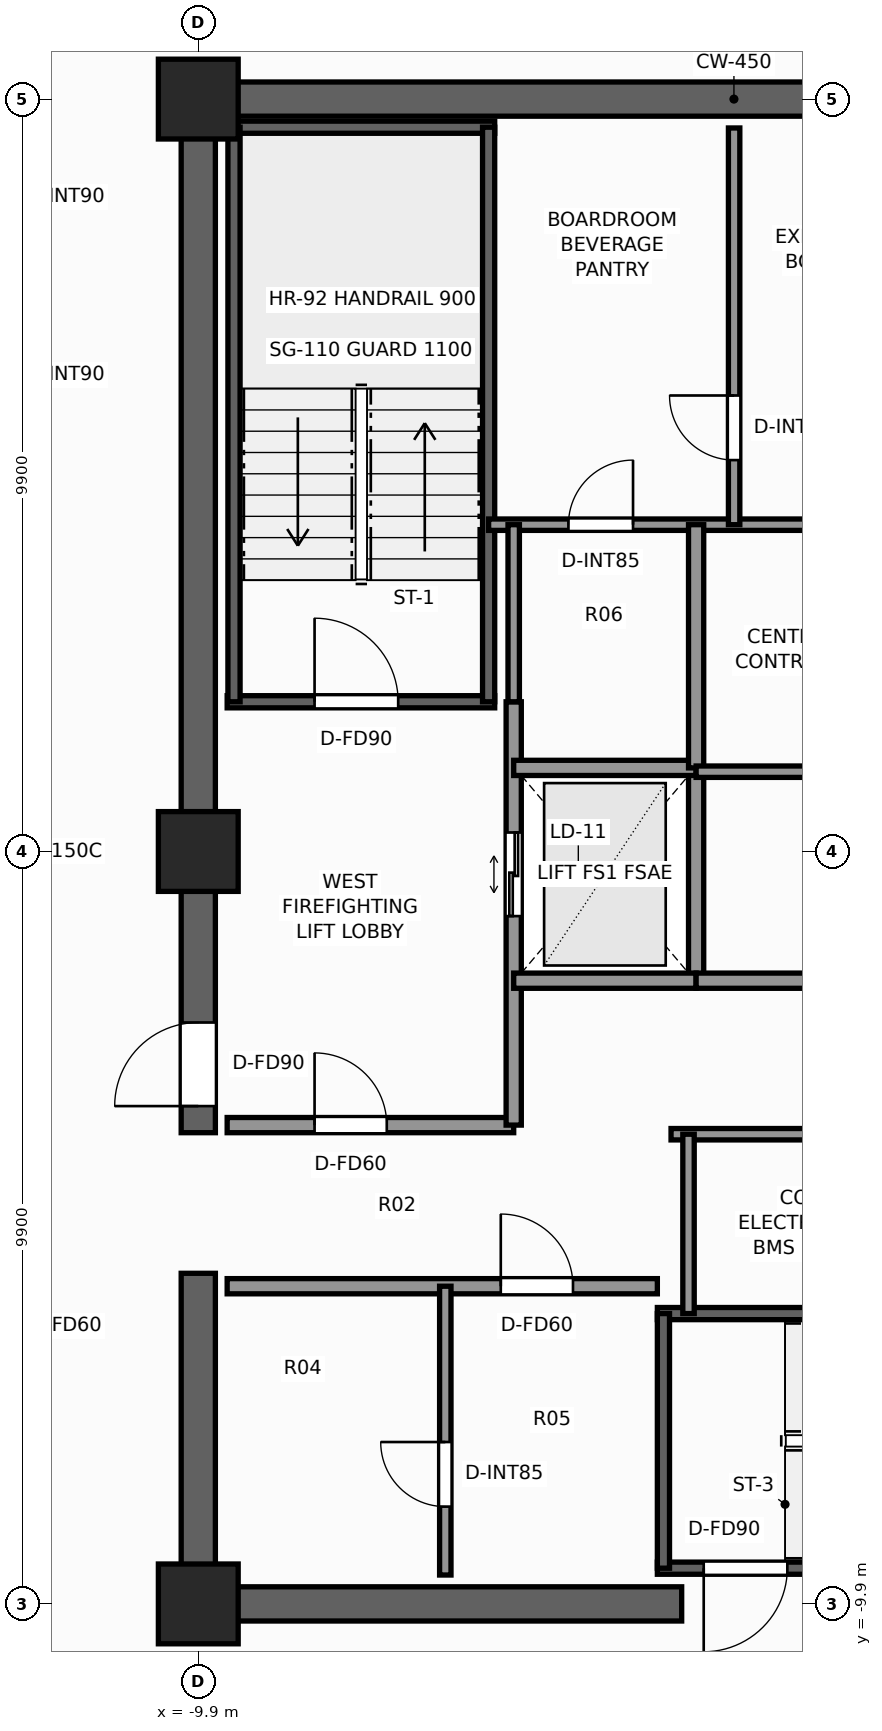
"""IFC4 building model, lengths in metres.
Left out: names, types, materials, properties, quantities, classifications, styles, units other than length and angle.
Written with IfcOpenShell. Run it as: python <this file> out.ifc"""

import sys

from ifc_helpers import new_model, si_unit, direction, frame, frame_2d, origin, origin_2d, place, context, subcontext, project, spatial, rectangle, extrude, element, fill, save


model = new_model("IFC4")
c1 = context("Model", 3, precision=1e-05, world=origin(), true_north=direction((0.0, 1.0)))
c2 = subcontext(c1, "Body", "Model", "MODEL_VIEW")
j1 = project(units=[si_unit("LENGTHUNIT", "METRE"), si_unit("PLANEANGLEUNIT", "RADIAN")], contexts=[c1])
p1 = place(None, origin())
s1 = spatial("IfcSite", under=j1, at=p1, CompositionType="ELEMENT")
p2 = place(p1, origin())
s2 = spatial("IfcBuilding", under=s1, at=p2, CompositionType="ELEMENT")
p3 = place(p2, frame((0.0, 0.0, 237.4)))
s3 = spatial("IfcBuildingStorey", under=s2, at=p3, CompositionType="ELEMENT", Elevation=237.4)
p4 = place(p3, frame((-3.54, -9.9, 0.0), z_axis=(0.0, 0.0, 1.0), x_axis=(-1.0, 0.0, 0.0)))
e1 = element("IfcWall", 1, at=p4, inside=s3, PredefinedType="SHEAR", context=c2, shape_type="SweptSolid", body=[
    extrude(rectangle(XDim=6.585, YDim=0.45, at=frame_2d((3.292, 0.0))), origin(), (0.0, 0.0, 1.0), 3.5),
])
p5 = place(p3, frame((-10.125, 9.9, 0.0), z_axis=(0.0, 0.0, 1.0), x_axis=(1.0, 0.0, 0.0)))
e2 = element("IfcWall", 2, at=p5, inside=s3, PredefinedType="SHEAR", context=c2, shape_type="SweptSolid", body=[
    extrude(rectangle(XDim=14.545, YDim=0.45, at=frame_2d((7.272, 0.0))), origin(), (0.0, 0.0, 1.0), 3.5),
])
p6 = place(p3, frame((-9.9, -9.675, 0.0), z_axis=(0.0, 0.0, 1.0), x_axis=(0.0, 1.0, 0.0)))
e3 = element("IfcWall", 3, at=p6, inside=s3, PredefinedType="SHEAR", context=c2, shape_type="SweptSolid", body=[
    extrude(rectangle(XDim=4.125, YDim=0.45, at=frame_2d((2.062, 0.0))), origin(), (0.0, 0.0, 1.0), 3.5),
])
p7 = place(p3, frame((-9.9, -3.7, 0.0), z_axis=(0.0, 0.0, 1.0), x_axis=(0.0, 1.0, 0.0)))
e4 = element("IfcWall", 4, at=p7, inside=s3, PredefinedType="SHEAR", context=c2, shape_type="SweptSolid", body=[
    extrude(rectangle(XDim=13.375, YDim=0.45, at=frame_2d((6.688, 0.0))), origin(), (0.0, 0.0, 1.0), 3.5),
])
p8 = place(p7, frame((0.35, 0.0, 0.0)))
e5 = element("IfcOpeningElement", 5, at=p8, cuts=e4, PredefinedType="OPENING", context=c2, shape_type="SweptSolid", body=[
    extrude(rectangle(XDim=1.1, YDim=2.2, at=frame_2d((0.55, 1.1))), frame((0.0, 0.235, 0.0), z_axis=(0.0, -1.0, 0.0), x_axis=(1.0, 0.0, 0.0)), (0.0, 0.0, 1.0), 0.47),
])
for number, where, z_axis, x_axis in (
    (6, (-9.9, -9.9, 0.0), (0.0, 0.0, 1.0), (1.0, 0.0, 0.0)),
    (7, (-9.9, 9.9, 0.0), (0.0, 0.0, 1.0), (1.0, 0.0, 0.0)),
    (8, (-9.9, 0.0, 0.0), (0.0, 0.0, 1.0), (1.0, 0.0, 0.0)),
):
    element("IfcColumn", number, at=place(p3, frame(where, z_axis=z_axis, x_axis=x_axis)), inside=s3, PredefinedType="COLUMN", context=c2, shape_type="SweptSolid", body=[
        extrude(rectangle(XDim=1.05, YDim=1.05, at=origin_2d()), origin(), (0.0, 0.0, 1.0), 3.5),
    ])
p9 = place(p3, frame((-9.52, 1.97, 0.0), z_axis=(0.0, 0.0, 1.0), x_axis=(1.0, 0.0, 0.0)))
e9 = element("IfcWall", 9, at=p9, inside=s3, PredefinedType="SHEAR", context=c2, shape_type="SweptSolid", body=[
    extrude(rectangle(XDim=3.52, YDim=0.16, at=frame_2d((1.76, 0.0))), origin(), (0.0, 0.0, 1.0), 3.5),
])
p10 = place(p9, frame((1.15, 0.0, 0.0)))
e10 = element("IfcOpeningElement", 10, at=p10, cuts=e9, PredefinedType="OPENING", context=c2, shape_type="SweptSolid", body=[
    extrude(rectangle(XDim=1.1, YDim=2.2, at=frame_2d((0.55, 1.1))), frame((0.0, 0.09, 0.0), z_axis=(0.0, -1.0, 0.0), x_axis=(1.0, 0.0, 0.0)), (0.0, 0.0, 1.0), 0.18),
])
p11 = place(p3, frame((-9.52, 9.53, 0.0), z_axis=(0.0, 0.0, 1.0), x_axis=(1.0, 0.0, 0.0)))
e11 = element("IfcWall", 11, at=p11, inside=s3, PredefinedType="SHEAR", context=c2, shape_type="SweptSolid", body=[
    extrude(rectangle(XDim=3.52, YDim=0.16, at=frame_2d((1.76, 0.0))), origin(), (0.0, 0.0, 1.0), 3.5),
])
for number, where, z_axis, x_axis in (
    (12, (-9.43, 1.97, 0.0), (0.0, 0.0, 1.0), (0.0, 1.0, 0.0)),
    (13, (-6.08, 1.97, 0.0), (0.0, 0.0, 1.0), (0.0, 1.0, 0.0)),
):
    element("IfcWall", number, at=place(p3, frame(where, z_axis=z_axis, x_axis=x_axis)), inside=s3, PredefinedType="SHEAR", context=c2, shape_type="SweptSolid", body=[
        extrude(rectangle(XDim=7.56, YDim=0.16, at=frame_2d((3.78, 0.0))), origin(), (0.0, 0.0, 1.0), 3.5),
    ])
p12 = place(p3, frame((3.86, -9.43, 0.0), z_axis=(0.0, 0.0, 1.0), x_axis=(-1.0, 0.0, 0.0)))
e14 = element("IfcWall", 14, at=p12, inside=s3, PredefinedType="SHEAR", context=c2, shape_type="SweptSolid", body=[
    extrude(rectangle(XDim=7.72, YDim=0.16, at=frame_2d((3.86, 0.0))), origin(), (0.0, 0.0, 1.0), 3.5),
])
p13 = place(p12, frame((6.01, 0.0, 0.0)))
e15 = element("IfcOpeningElement", 15, at=p13, cuts=e14, PredefinedType="OPENING", context=c2, shape_type="SweptSolid", body=[
    extrude(rectangle(XDim=1.1, YDim=2.2, at=frame_2d((0.55, 1.1))), frame((0.0, 0.09, 0.0), z_axis=(0.0, -1.0, 0.0), x_axis=(1.0, 0.0, 0.0)), (0.0, 0.0, 1.0), 0.18),
])
p14 = place(p3, frame((-3.86, -6.08, 0.0), z_axis=(0.0, 0.0, 1.0), x_axis=(1.0, 0.0, 0.0)))
e16 = element("IfcWall", 16, at=p14, inside=s3, PredefinedType="SHEAR", context=c2, shape_type="SweptSolid", body=[
    extrude(rectangle(XDim=7.72, YDim=0.16, at=frame_2d((3.86, 0.0))), origin(), (0.0, 0.0, 1.0), 3.5),
])
p15 = place(p3, frame((-3.78, -9.43, 0.0), z_axis=(0.0, 0.0, 1.0), x_axis=(0.0, 1.0, 0.0)))
e17 = element("IfcWall", 17, at=p15, inside=s3, PredefinedType="SHEAR", context=c2, shape_type="SweptSolid", body=[
    extrude(rectangle(XDim=3.35, YDim=0.16, at=frame_2d((1.675, 0.0))), origin(), (0.0, 0.0, 1.0), 3.5),
])
p16 = place(p3, frame((-9.52, -3.6, 0.0), z_axis=(0.0, 0.0, 1.0), x_axis=(1.0, 0.0, 0.0)))
e18 = element("IfcWall", 18, at=p16, inside=s3, PredefinedType="SOLIDWALL", context=c2, shape_type="SweptSolid", body=[
    extrude(rectangle(XDim=3.77, YDim=0.2, at=frame_2d((1.885, 0.0))), origin(), (0.0, 0.0, 1.0), 3.25),
])
p17 = place(p16, frame((1.15, 0.0, 0.0)))
e19 = element("IfcOpeningElement", 19, at=p17, cuts=e18, PredefinedType="OPENING", context=c2, shape_type="SweptSolid", body=[
    extrude(rectangle(XDim=0.95, YDim=2.06, at=frame_2d((0.475, 1.03))), frame((0.0, 0.11, 0.0), z_axis=(0.0, -1.0, 0.0), x_axis=(1.0, 0.0, 0.0)), (0.0, 0.0, 1.0), 0.22),
])
p18 = place(p3, frame((-5.75, -3.6, 0.0), z_axis=(0.0, 0.0, 1.0), x_axis=(0.0, 1.0, 0.0)))
e20 = element("IfcWall", 20, at=p18, inside=s3, PredefinedType="SOLIDWALL", context=c2, shape_type="SweptSolid", body=[
    extrude(rectangle(XDim=5.57, YDim=0.2, at=frame_2d((2.785, 0.0))), origin(), (0.0, 0.0, 1.0), 3.25),
])
p19 = place(p18, frame((2.75, 0.0, 0.0)))
e21 = element("IfcOpeningElement", 21, at=p19, cuts=e20, PredefinedType="OPENING", context=c2, shape_type="SweptSolid", body=[
    extrude(rectangle(XDim=1.1, YDim=2.2, at=frame_2d((0.55, 1.1))), frame((0.0, 0.11, 0.0), z_axis=(0.0, -1.0, 0.0), x_axis=(1.0, 0.0, 0.0)), (0.0, 0.0, 1.0), 0.22),
])
p20 = place(p3, frame((-3.35, -1.7, 0.0), z_axis=(0.0, 0.0, 1.0), x_axis=(0.0, 1.0, 0.0)))
e22 = element("IfcWall", 22, at=p20, inside=s3, PredefinedType="SOLIDWALL", context=c2, shape_type="SweptSolid", body=[
    extrude(rectangle(XDim=2.8, YDim=0.2, at=frame_2d((1.4, 0.0))), origin(), (0.0, 0.0, 1.0), 3.25),
])
for number, where, z_axis, x_axis in (
    (23, (-5.75, -1.7, 0.0), (0.0, 0.0, 1.0), (1.0, 0.0, 0.0)),
    (24, (-5.75, 1.1, 0.0), (0.0, 0.0, 1.0), (1.0, 0.0, 0.0)),
):
    element("IfcWall", number, at=place(p3, frame(where, z_axis=z_axis, x_axis=x_axis)), inside=s3, PredefinedType="SOLIDWALL", context=c2, shape_type="SweptSolid", body=[
        extrude(rectangle(XDim=2.4, YDim=0.2, at=frame_2d((1.2, 0.0))), origin(), (0.0, 0.0, 1.0), 3.25),
    ])
p21 = place(p3, frame((-6.08, 4.3, 0.0), z_axis=(0.0, 0.0, 1.0), x_axis=(1.0, 0.0, 0.0)))
e25 = element("IfcWall", 25, at=p21, inside=s3, PredefinedType="PARTITIONING", context=c2, shape_type="SweptSolid", body=[
    extrude(rectangle(XDim=6.3, YDim=0.15, at=frame_2d((3.15, 0.0))), origin(), (0.0, 0.0, 1.0), 3.25),
])
p22 = place(p21, frame((1.05, 0.0, 0.0)))
e26 = element("IfcOpeningElement", 26, at=p22, cuts=e25, PredefinedType="OPENING", context=c2, shape_type="SweptSolid", body=[
    extrude(rectangle(XDim=0.85, YDim=2.03, at=frame_2d((0.425, 1.015))), frame((0.0, 0.085, 0.0), z_axis=(0.0, -1.0, 0.0), x_axis=(1.0, 0.0, 0.0)), (0.0, 0.0, 1.0), 0.17),
])
p23 = place(p3, frame((-2.85, 4.3, 0.0), z_axis=(0.0, 0.0, 1.0), x_axis=(0.0, 1.0, 0.0)))
e27 = element("IfcWall", 27, at=p23, inside=s3, PredefinedType="PARTITIONING", context=c2, shape_type="SweptSolid", body=[
    extrude(rectangle(XDim=5.22, YDim=0.15, at=frame_2d((2.61, 0.0))), origin(), (0.0, 0.0, 1.0), 3.25),
])
p24 = place(p23, frame((0.85, 0.0, 0.0)))
e28 = element("IfcOpeningElement", 28, at=p24, cuts=e27, PredefinedType="OPENING", context=c2, shape_type="SweptSolid", body=[
    extrude(rectangle(XDim=0.85, YDim=2.03, at=frame_2d((0.425, 1.015))), frame((0.0, 0.085, 0.0), z_axis=(0.0, -1.0, 0.0), x_axis=(1.0, 0.0, 0.0)), (0.0, 0.0, 1.0), 0.17),
])
p25 = place(p3, frame((-9.52, -5.72, 0.0), z_axis=(0.0, 0.0, 1.0), x_axis=(1.0, 0.0, 0.0)))
e29 = element("IfcWall", 29, at=p25, inside=s3, PredefinedType="SOLIDWALL", context=c2, shape_type="SweptSolid", body=[
    extrude(rectangle(XDim=5.66, YDim=0.2, at=frame_2d((2.83, 0.0))), origin(), (0.0, 0.0, 1.0), 3.25),
])
p26 = place(p25, frame((3.6, 0.0, 0.0)))
e30 = element("IfcOpeningElement", 30, at=p26, cuts=e29, PredefinedType="OPENING", context=c2, shape_type="SweptSolid", body=[
    extrude(rectangle(XDim=0.95, YDim=2.06, at=frame_2d((0.475, 1.03))), frame((0.0, 0.11, 0.0), z_axis=(0.0, -1.0, 0.0), x_axis=(1.0, 0.0, 0.0)), (0.0, 0.0, 1.0), 0.22),
])
p27 = place(p3, frame((-6.65, -9.52, 0.0), z_axis=(0.0, 0.0, 1.0), x_axis=(0.0, 1.0, 0.0)))
e31 = element("IfcWall", 31, at=p27, inside=s3, PredefinedType="PARTITIONING", context=c2, shape_type="SweptSolid", body=[
    extrude(rectangle(XDim=3.8, YDim=0.15, at=frame_2d((1.9, 0.0))), origin(), (0.0, 0.0, 1.0), 3.25),
])
p28 = place(p27, frame((0.9, 0.0, 0.0)))
e32 = element("IfcOpeningElement", 32, at=p28, cuts=e31, PredefinedType="OPENING", context=c2, shape_type="SweptSolid", body=[
    extrude(rectangle(XDim=0.85, YDim=2.03, at=frame_2d((0.425, 1.015))), frame((0.0, 0.085, 0.0), z_axis=(0.0, -1.0, 0.0), x_axis=(1.0, 0.0, 0.0)), (0.0, 0.0, 1.0), 0.17),
])
p29 = place(p3, frame((-3.35, -1.7, 0.0), z_axis=(0.0, 0.0, 1.0), x_axis=(1.0, 0.0, 0.0)))
e33 = element("IfcWall", 33, at=p29, inside=s3, PredefinedType="SOLIDWALL", context=c2, shape_type="SweptSolid", body=[
    extrude(rectangle(XDim=6.7, YDim=0.2, at=frame_2d((3.35, 0.0))), origin(), (0.0, 0.0, 1.0), 3.25),
])
p30 = place(p3, frame((-3.35, 1.1, 0.0), z_axis=(0.0, 0.0, 1.0), x_axis=(0.0, 1.0, 0.0)))
e34 = element("IfcWall", 34, at=p30, inside=s3, PredefinedType="SOLIDWALL", context=c2, shape_type="SweptSolid", body=[
    extrude(rectangle(XDim=3.2, YDim=0.2, at=frame_2d((1.6, 0.0))), origin(), (0.0, 0.0, 1.0), 3.25),
])
p31 = place(p3, frame((-3.35, 1.05, 0.0), z_axis=(0.0, 0.0, 1.0), x_axis=(1.0, 0.0, 0.0)))
e35 = element("IfcWall", 35, at=p31, inside=s3, PredefinedType="PARTITIONING", context=c2, shape_type="SweptSolid", body=[
    extrude(rectangle(XDim=6.7, YDim=0.15, at=frame_2d((3.35, 0.0))), origin(), (0.0, 0.0, 1.0), 3.25),
])
p32 = place(p31, frame((4.2, 0.0, 0.0)))
e36 = element("IfcOpeningElement", 36, at=p32, cuts=e35, PredefinedType="OPENING", context=c2, shape_type="SweptSolid", body=[
    extrude(rectangle(XDim=0.85, YDim=2.03, at=frame_2d((0.425, 1.015))), frame((0.0, 0.085, 0.0), z_axis=(0.0, -1.0, 0.0), x_axis=(1.0, 0.0, 0.0)), (0.0, 0.0, 1.0), 0.17),
])
p33 = place(p3, frame((-3.68, -3.72, 0.0), z_axis=(0.0, 0.0, 1.0), x_axis=(1.0, 0.0, 0.0)))
e37 = element("IfcWall", 37, at=p33, inside=s3, PredefinedType="PARTITIONING", context=c2, shape_type="SweptSolid", body=[
    extrude(rectangle(XDim=7.36, YDim=0.15, at=frame_2d((3.68, 0.0))), origin(), (0.0, 0.0, 1.0), 3.25),
])
p34 = place(p3, frame((-3.45, -6.08, 0.0), z_axis=(0.0, 0.0, 1.0), x_axis=(0.0, 1.0, 0.0)))
e38 = element("IfcWall", 38, at=p34, inside=s3, PredefinedType="PARTITIONING", context=c2, shape_type="SweptSolid", body=[
    extrude(rectangle(XDim=2.36, YDim=0.15, at=frame_2d((1.18, 0.0))), origin(), (0.0, 0.0, 1.0), 3.25),
])
p35 = place(p3, frame((-5.75, 1.97, 0.0), z_axis=(0.0, 0.0, 1.0), x_axis=(0.0, 1.0, 0.0)))
e39 = element("IfcWall", 39, at=p35, inside=s3, PredefinedType="PARTITIONING", context=c2, shape_type="SweptSolid", body=[
    extrude(rectangle(XDim=2.33, YDim=0.15, at=frame_2d((1.165, 0.0))), origin(), (0.0, 0.0, 1.0), 3.25),
])
p36 = place(p10, origin())
e40 = element("IfcDoor", 40, at=p36, inside=s3, OperationType="SINGLE_SWING_LEFT", PredefinedType="DOOR", context=c2, shape_type="SweptSolid", body=[
    extrude(rectangle(XDim=1.1, YDim=2.2, at=frame_2d((0.55, 1.1))), frame((0.0, 0.025, 0.0), z_axis=(0.0, -1.0, 0.0), x_axis=(1.0, 0.0, 0.0)), (0.0, 0.0, 1.0), 0.05),
])
fill(e10, e40)
p37 = place(p13, origin())
e41 = element("IfcDoor", 41, at=p37, inside=s3, OperationType="SINGLE_SWING_RIGHT", PredefinedType="DOOR", context=c2, shape_type="SweptSolid", body=[
    extrude(rectangle(XDim=1.1, YDim=2.2, at=frame_2d((0.55, 1.1))), frame((0.0, 0.025, 0.0), z_axis=(0.0, -1.0, 0.0), x_axis=(1.0, 0.0, 0.0)), (0.0, 0.0, 1.0), 0.05),
])
fill(e15, e41)
p38 = place(p8, origin())
e42 = element("IfcDoor", 42, at=p38, inside=s3, OperationType="SINGLE_SWING_LEFT", PredefinedType="DOOR", context=c2, shape_type="SweptSolid", body=[
    extrude(rectangle(XDim=1.1, YDim=2.2, at=frame_2d((0.55, 1.1))), frame((0.0, 0.025, 0.0), z_axis=(0.0, -1.0, 0.0), x_axis=(1.0, 0.0, 0.0)), (0.0, 0.0, 1.0), 0.05),
])
fill(e5, e42)
p39 = place(p19, origin())
e43 = element("IfcDoor", 43, at=p39, inside=s3, OperationType="DOUBLE_DOOR_SLIDING", PredefinedType="DOOR", context=c2, shape_type="SweptSolid", body=[
    extrude(rectangle(XDim=1.1, YDim=2.2, at=frame_2d((0.55, 1.1))), frame((0.0, 0.025, 0.0), z_axis=(0.0, -1.0, 0.0), x_axis=(1.0, 0.0, 0.0)), (0.0, 0.0, 1.0), 0.05),
])
fill(e21, e43)
p40 = place(p24, origin())
e44 = element("IfcDoor", 44, at=p40, inside=s3, OperationType="SINGLE_SWING_RIGHT", PredefinedType="DOOR", context=c2, shape_type="SweptSolid", body=[
    extrude(rectangle(XDim=0.85, YDim=2.03, at=frame_2d((0.425, 1.015))), frame((0.0, 0.025, 0.0), z_axis=(0.0, -1.0, 0.0), x_axis=(1.0, 0.0, 0.0)), (0.0, 0.0, 1.0), 0.05),
])
fill(e28, e44)
p41 = place(p26, origin())
e45 = element("IfcDoor", 45, at=p41, inside=s3, OperationType="SINGLE_SWING_LEFT", PredefinedType="DOOR", context=c2, shape_type="SweptSolid", body=[
    extrude(rectangle(XDim=0.95, YDim=2.06, at=frame_2d((0.475, 1.03))), frame((0.0, 0.025, 0.0), z_axis=(0.0, -1.0, 0.0), x_axis=(1.0, 0.0, 0.0)), (0.0, 0.0, 1.0), 0.05),
])
fill(e30, e45)
p42 = place(p28, origin())
e46 = element("IfcDoor", 46, at=p42, inside=s3, OperationType="SINGLE_SWING_RIGHT", PredefinedType="DOOR", context=c2, shape_type="SweptSolid", body=[
    extrude(rectangle(XDim=0.85, YDim=2.03, at=frame_2d((0.425, 1.015))), frame((0.0, 0.025, 0.0), z_axis=(0.0, -1.0, 0.0), x_axis=(1.0, 0.0, 0.0)), (0.0, 0.0, 1.0), 0.05),
])
fill(e32, e46)
p43 = place(p17, origin())
e47 = element("IfcDoor", 47, at=p43, inside=s3, OperationType="SINGLE_SWING_LEFT", PredefinedType="DOOR", context=c2, shape_type="SweptSolid", body=[
    extrude(rectangle(XDim=0.95, YDim=2.06, at=frame_2d((0.475, 1.03))), frame((0.0, 0.025, 0.0), z_axis=(0.0, -1.0, 0.0), x_axis=(1.0, 0.0, 0.0)), (0.0, 0.0, 1.0), 0.05),
])
fill(e19, e47)
p44 = place(p22, origin())
e48 = element("IfcDoor", 48, at=p44, inside=s3, OperationType="SINGLE_SWING_RIGHT", PredefinedType="DOOR", context=c2, shape_type="SweptSolid", body=[
    extrude(rectangle(XDim=0.85, YDim=2.03, at=frame_2d((0.425, 1.015))), frame((0.0, 0.025, 0.0), z_axis=(0.0, -1.0, 0.0), x_axis=(1.0, 0.0, 0.0)), (0.0, 0.0, 1.0), 0.05),
])
fill(e26, e48)
save(model, sys.argv[1])
